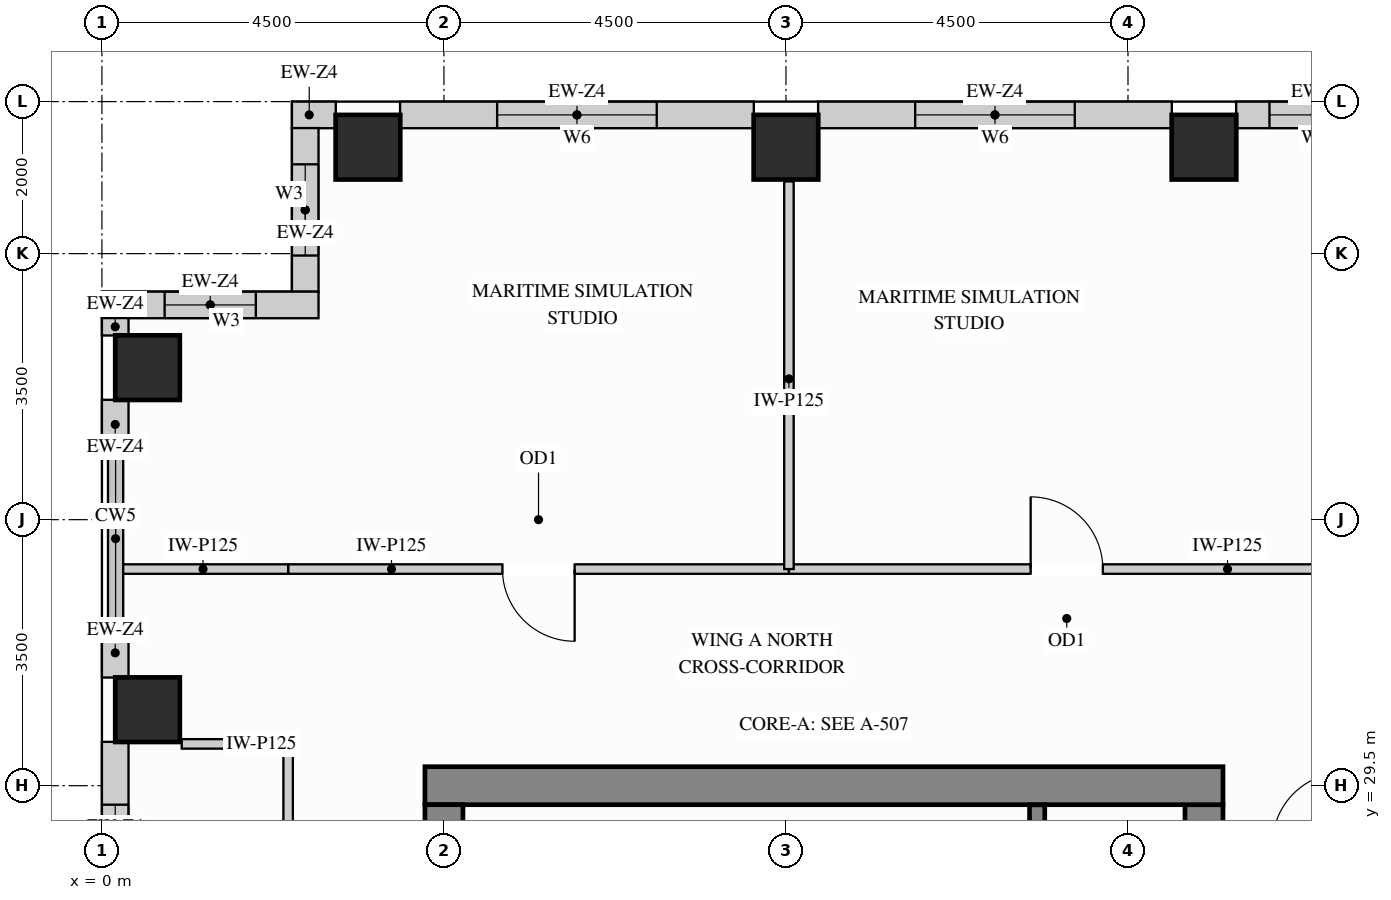
"""IFC4 building model, lengths in metres.
Left out: names, types, materials, properties, quantities, classifications, styles, units other than length and angle.
Written with IfcOpenShell. Run it as: python <this file> out.ifc"""

import sys

from ifc_helpers import new_model, si_unit, direction, frame, frame_2d, origin, origin_2d, place, context, subcontext, project, spatial, rectangle, extrude, source, transform, mapped, element, fill, save


model = new_model("IFC4")
c1 = context("Model", 3, precision=1e-05, world=origin(), true_north=direction((0.0, 1.0)))
c2 = subcontext(c1, "Body", "Model", "MODEL_VIEW")
j1 = project(units=[si_unit("LENGTHUNIT", "METRE"), si_unit("PLANEANGLEUNIT", "RADIAN")], contexts=[c1])
p1 = place(None, origin())
s1 = spatial("IfcSite", under=j1, at=p1, CompositionType="ELEMENT")
p2 = place(p1, origin())
s2 = spatial("IfcBuilding", under=s1, at=p2, CompositionType="ELEMENT")
p3 = place(p2, frame((0.0, 0.0, 273.6)))
s3 = spatial("IfcBuildingStorey", under=s2, at=p3, CompositionType="ELEMENT", Elevation=273.6)
m1 = source(origin(), c2, "Body", "SweptSolid", [
    extrude(rectangle(XDim=0.85, YDim=0.85, at=origin_2d()), origin(), (0.0, 0.0, 1.0), 3.37),
])
for number, where, z_axis, x_axis in (
    (1, (14.5, 37.9, 0.0), (0.0, 0.0, 1.0), (1.0, 0.0, 0.0)),
    (2, (3.5, 37.9, 0.0), (0.0, 0.0, 1.0), (1.0, 0.0, 0.0)),
    (3, (9.0, 37.9, 0.0), (0.0, 0.0, 1.0), (1.0, 0.0, 0.0)),
    (4, (0.6, 30.5, 0.0), (0.0, 0.0, 1.0), (1.0, 0.0, 0.0)),
    (5, (0.6, 35.0, 0.0), (0.0, 0.0, 1.0), (1.0, 0.0, 0.0)),
):
    element("IfcColumn", number, at=place(p3, frame(where, z_axis=z_axis, x_axis=x_axis)), inside=s3, PredefinedType="COLUMN", context=c2, shape_type="MappedRepresentation", body=[
        mapped(m1, transform((0.0, 0.0, 0.0), x_axis=(1.0, 0.0, 0.0), y_axis=(0.0, 1.0, 0.0), z_axis=(0.0, 0.0, 1.0))),
    ])
m2 = source(origin(), c2, "Body", "SweptSolid", [
    extrude(rectangle(XDim=8.37, YDim=0.5, at=frame_2d((4.185, 0.0))), origin(), (0.0, 0.0, 1.0), 3.37),
])
p4 = place(p3, frame((14.5, 20.88, 0.0), z_axis=(0.0, 0.0, 1.0), x_axis=(0.0, 1.0, 0.0)))
e6 = element("IfcWall", 6, at=p4, inside=s3, PredefinedType="SHEAR", context=c2, shape_type="MappedRepresentation", body=[
    mapped(m2, transform((0.0, 0.0, 0.0), x_axis=(1.0, 0.0, 0.0), y_axis=(0.0, 1.0, 0.0), z_axis=(0.0, 0.0, 1.0))),
])
m3 = source(origin(), c2, "Body", "SweptSolid", [
    extrude(rectangle(XDim=10.5, YDim=0.5, at=frame_2d((5.25, 0.0))), origin(), (0.0, 0.0, 1.0), 3.37),
])
p5 = place(p3, frame((4.25, 29.5, 0.0), z_axis=(0.0, 0.0, 1.0), x_axis=(1.0, 0.0, 0.0)))
e7 = element("IfcWall", 7, at=p5, inside=s3, PredefinedType="SHEAR", context=c2, shape_type="MappedRepresentation", body=[
    mapped(m3, transform((0.0, 0.0, 0.0), x_axis=(1.0, 0.0, 0.0), y_axis=(0.0, 1.0, 0.0), z_axis=(0.0, 0.0, 1.0))),
])
m4 = source(origin(), c2, "Body", "SweptSolid", [
    extrude(rectangle(XDim=20.5, YDim=0.5, at=frame_2d((10.25, 0.0))), origin(), (0.0, 0.0, 1.0), 3.37),
])
p6 = place(p3, frame((4.5, 8.75, 0.0), z_axis=(0.0, 0.0, 1.0), x_axis=(0.0, 1.0, 0.0)))
e8 = element("IfcWall", 8, at=p6, inside=s3, PredefinedType="SHEAR", context=c2, shape_type="MappedRepresentation", body=[
    mapped(m4, transform((0.0, 0.0, 0.0), x_axis=(1.0, 0.0, 0.0), y_axis=(0.0, 1.0, 0.0), z_axis=(0.0, 0.0, 1.0))),
])
p7 = place(p3, frame((17.0, 38.325, 0.0), z_axis=(0.0, 0.0, 1.0), x_axis=(-1.0, 0.0, 0.0)))
e9 = element("IfcWall", 9, at=p7, inside=s3, PredefinedType="SOLIDWALL", context=c2, shape_type="SweptSolid", body=[
    extrude(rectangle(XDim=2.077, YDim=0.35, at=frame_2d((1.039, 0.0))), origin(), (0.0, 0.0, 1.0), 3.355),
])
p8 = place(p7, frame((0.438, 0.0, 0.78)))
e10 = element("IfcOpeningElement", 10, at=p8, cuts=e9, PredefinedType="OPENING", context=c2, shape_type="SweptSolid", body=[
    extrude(rectangle(XDim=1.2, YDim=2.25, at=frame_2d((0.6, 1.125))), frame((0.0, 0.185, 0.0), z_axis=(0.0, -1.0, 0.0), x_axis=(1.0, 0.0, 0.0)), (0.0, 0.0, 1.0), 0.37),
])
p9 = place(p3, frame((14.077, 38.325, 0.0), z_axis=(0.0, 0.0, 1.0), x_axis=(-1.0, 0.0, 0.0)))
e11 = element("IfcWall", 11, at=p9, inside=s3, PredefinedType="SOLIDWALL", context=c2, shape_type="SweptSolid", body=[
    extrude(rectangle(XDim=4.654, YDim=0.35, at=frame_2d((2.327, 0.0))), origin(), (0.0, 0.0, 1.0), 3.355),
])
p10 = place(p9, frame((1.277, 0.0, 0.78)))
e12 = element("IfcOpeningElement", 12, at=p10, cuts=e11, PredefinedType="OPENING", context=c2, shape_type="SweptSolid", body=[
    extrude(rectangle(XDim=2.1, YDim=2.25, at=frame_2d((1.05, 1.125))), frame((0.0, 0.185, 0.0), z_axis=(0.0, -1.0, 0.0), x_axis=(1.0, 0.0, 0.0)), (0.0, 0.0, 1.0), 0.37),
])
p11 = place(p3, frame((8.577, 38.325, 0.0), z_axis=(0.0, 0.0, 1.0), x_axis=(-1.0, 0.0, 0.0)))
e13 = element("IfcWall", 13, at=p11, inside=s3, PredefinedType="SOLIDWALL", context=c2, shape_type="SweptSolid", body=[
    extrude(rectangle(XDim=4.654, YDim=0.35, at=frame_2d((2.327, 0.0))), origin(), (0.0, 0.0, 1.0), 3.355),
])
p12 = place(p11, frame((1.277, 0.0, 0.78)))
e14 = element("IfcOpeningElement", 14, at=p12, cuts=e13, PredefinedType="OPENING", context=c2, shape_type="SweptSolid", body=[
    extrude(rectangle(XDim=2.1, YDim=2.25, at=frame_2d((1.05, 1.125))), frame((0.0, 0.185, 0.0), z_axis=(0.0, -1.0, 0.0), x_axis=(1.0, 0.0, 0.0)), (0.0, 0.0, 1.0), 0.37),
])
m5 = source(origin(), c2, "Body", "SweptSolid", [
    extrude(rectangle(XDim=0.577, YDim=0.35, at=frame_2d((0.289, 0.0))), origin(), (0.0, 0.0, 1.0), 3.355),
])
p13 = place(p3, frame((3.077, 38.325, 0.0), z_axis=(0.0, 0.0, 1.0), x_axis=(-1.0, 0.0, 0.0)))
e15 = element("IfcWall", 15, at=p13, inside=s3, PredefinedType="SOLIDWALL", context=c2, shape_type="MappedRepresentation", body=[
    mapped(m5, transform((0.0, 0.0, 0.0), x_axis=(1.0, 0.0, 0.0), y_axis=(0.0, 1.0, 0.0), z_axis=(0.0, 0.0, 1.0))),
])
p14 = place(p3, frame((2.675, 38.152, 0.0), z_axis=(0.0, 0.0, 1.0), x_axis=(0.0, -1.0, 0.0)))
e16 = element("IfcWall", 16, at=p14, inside=s3, PredefinedType="SOLIDWALL", context=c2, shape_type="SweptSolid", body=[
    extrude(rectangle(XDim=2.154, YDim=0.35, at=frame_2d((1.077, 0.0))), origin(), (0.0, 0.0, 1.0), 3.355),
])
p15 = place(p14, frame((0.477, 0.0, 0.78)))
e17 = element("IfcOpeningElement", 17, at=p15, cuts=e16, PredefinedType="OPENING", context=c2, shape_type="SweptSolid", body=[
    extrude(rectangle(XDim=1.2, YDim=2.25, at=frame_2d((0.6, 1.125))), frame((0.0, 0.185, 0.0), z_axis=(0.0, -1.0, 0.0), x_axis=(1.0, 0.0, 0.0)), (0.0, 0.0, 1.0), 0.37),
])
p16 = place(p3, frame((2.85, 35.825, 0.0), z_axis=(0.0, 0.0, 1.0), x_axis=(-1.0, 0.0, 0.0)))
e18 = element("IfcWall", 18, at=p16, inside=s3, PredefinedType="SOLIDWALL", context=c2, shape_type="SweptSolid", body=[
    extrude(rectangle(XDim=2.85, YDim=0.35, at=frame_2d((1.425, 0.0))), origin(), (0.0, 0.0, 1.0), 3.355),
])
p17 = place(p16, frame((0.825, 0.0, 0.78)))
e19 = element("IfcOpeningElement", 19, at=p17, cuts=e18, PredefinedType="OPENING", context=c2, shape_type="SweptSolid", body=[
    extrude(rectangle(XDim=1.2, YDim=2.25, at=frame_2d((0.6, 1.125))), frame((0.0, 0.185, 0.0), z_axis=(0.0, -1.0, 0.0), x_axis=(1.0, 0.0, 0.0)), (0.0, 0.0, 1.0), 0.37),
])
m6 = source(origin(), c2, "Body", "SweptSolid", [
    extrude(rectangle(XDim=0.229, YDim=0.35, at=frame_2d((0.115, 0.0))), origin(), (0.0, 0.0, 1.0), 3.355),
])
p18 = place(p3, frame((0.175, 35.652, 0.0), z_axis=(0.0, 0.0, 1.0), x_axis=(0.0, -1.0, 0.0)))
e20 = element("IfcWall", 20, at=p18, inside=s3, PredefinedType="SOLIDWALL", context=c2, shape_type="MappedRepresentation", body=[
    mapped(m6, transform((0.0, 0.0, 0.0), x_axis=(1.0, 0.0, 0.0), y_axis=(0.0, 1.0, 0.0), z_axis=(0.0, 0.0, 1.0))),
])
m7 = source(origin(), c2, "Body", "SweptSolid", [
    extrude(rectangle(XDim=0.527, YDim=0.35, at=frame_2d((0.263, 0.0))), origin(), (0.0, 0.0, 1.0), 3.355),
])
for number, where, z_axis, x_axis in (
    (21, (0.175, 34.577, 0.0), (0.0, 0.0, 1.0), (0.0, -1.0, 0.0)),
    (22, (0.175, 31.45, 0.0), (0.0, 0.0, 1.0), (0.0, -1.0, 0.0)),
):
    element("IfcWall", number, at=place(p3, frame(where, z_axis=z_axis, x_axis=x_axis)), inside=s3, PredefinedType="SOLIDWALL", context=c2, shape_type="MappedRepresentation", body=[
        mapped(m7, transform((0.0, 0.0, 0.0), x_axis=(1.0, 0.0, 0.0), y_axis=(0.0, 1.0, 0.0), z_axis=(0.0, 0.0, 1.0))),
    ])
p19 = place(p3, frame((0.175, 30.077, 0.0), z_axis=(0.0, 0.0, 1.0), x_axis=(0.0, -1.0, 0.0)))
e23 = element("IfcWall", 23, at=p19, inside=s3, PredefinedType="SOLIDWALL", context=c2, shape_type="SweptSolid", body=[
    extrude(rectangle(XDim=2.854, YDim=0.35, at=frame_2d((1.427, 0.0))), origin(), (0.0, 0.0, 1.0), 3.355),
])
p20 = place(p19, frame((0.827, 0.0, 0.78)))
e24 = element("IfcOpeningElement", 24, at=p20, cuts=e23, PredefinedType="OPENING", context=c2, shape_type="SweptSolid", body=[
    extrude(rectangle(XDim=1.2, YDim=2.25, at=frame_2d((0.6, 1.125))), frame((0.0, 0.185, 0.0), z_axis=(0.0, -1.0, 0.0), x_axis=(1.0, 0.0, 0.0)), (0.0, 0.0, 1.0), 0.37),
])
p21 = place(p3, frame((2.45, 32.35, 0.0), z_axis=(0.0, 0.0, 1.0), x_axis=(1.0, 0.0, 0.0)))
e25 = element("IfcWall", 25, at=p21, inside=s3, PredefinedType="PARTITIONING", context=c2, shape_type="SweptSolid", body=[
    extrude(rectangle(XDim=6.589, YDim=0.125, at=frame_2d((3.294, 0.0))), origin(), (0.0, 0.0, 1.0), 3.355),
])
p22 = place(p21, frame((2.82, 0.0, 0.0)))
e26 = element("IfcOpeningElement", 26, at=p22, cuts=e25, PredefinedType="OPENING", context=c2, shape_type="SweptSolid", body=[
    extrude(rectangle(XDim=0.95, YDim=2.15, at=frame_2d((0.475, 1.075))), frame((0.0, 0.073, 0.0), z_axis=(0.0, -1.0, 0.0), x_axis=(1.0, 0.0, 0.0)), (0.0, 0.0, 1.0), 0.145),
])
p23 = place(p3, frame((9.039, 32.35, 0.0), z_axis=(0.0, 0.0, 1.0), x_axis=(1.0, 0.0, 0.0)))
e27 = element("IfcWall", 27, at=p23, inside=s3, PredefinedType="PARTITIONING", context=c2, shape_type="SweptSolid", body=[
    extrude(rectangle(XDim=7.311, YDim=0.125, at=frame_2d((3.656, 0.0))), origin(), (0.0, 0.0, 1.0), 3.355),
])
p24 = place(p23, frame((3.18, 0.0, 0.0)))
e28 = element("IfcOpeningElement", 28, at=p24, cuts=e27, PredefinedType="OPENING", context=c2, shape_type="SweptSolid", body=[
    extrude(rectangle(XDim=0.95, YDim=2.15, at=frame_2d((0.475, 1.075))), frame((0.0, 0.073, 0.0), z_axis=(0.0, -1.0, 0.0), x_axis=(1.0, 0.0, 0.0)), (0.0, 0.0, 1.0), 0.145),
])
m8 = source(origin(), c2, "Body", "SweptSolid", [
    extrude(rectangle(XDim=2.24, YDim=0.125, at=frame_2d((1.12, 0.0))), origin(), (0.0, 0.0, 1.0), 3.355),
])
p25 = place(p3, frame((0.21, 32.35, 0.0), z_axis=(0.0, 0.0, 1.0), x_axis=(1.0, 0.0, 0.0)))
e29 = element("IfcWall", 29, at=p25, inside=s3, PredefinedType="PARTITIONING", context=c2, shape_type="MappedRepresentation", body=[
    mapped(m8, transform((0.0, 0.0, 0.0), x_axis=(1.0, 0.0, 0.0), y_axis=(0.0, 1.0, 0.0), z_axis=(0.0, 0.0, 1.0))),
])
m9 = source(origin(), c2, "Body", "SweptSolid", [
    extrude(rectangle(XDim=5.1, YDim=0.125, at=frame_2d((2.55, 0.0))), origin(), (0.0, 0.0, 1.0), 3.355),
])
p26 = place(p3, frame((9.039, 32.35, 0.0), z_axis=(0.0, 0.0, 1.0), x_axis=(0.0, 1.0, 0.0)))
e30 = element("IfcWall", 30, at=p26, inside=s3, PredefinedType="PARTITIONING", context=c2, shape_type="MappedRepresentation", body=[
    mapped(m9, transform((0.0, 0.0, 0.0), x_axis=(1.0, 0.0, 0.0), y_axis=(0.0, 1.0, 0.0), z_axis=(0.0, 0.0, 1.0))),
])
m10 = source(origin(), c2, "Body", "SweptSolid", [
    extrude(rectangle(XDim=1.4, YDim=0.125, at=frame_2d((0.7, 0.0))), origin(), (0.0, 0.0, 1.0), 3.355),
])
p27 = place(p3, frame((1.05, 30.05, 0.0), z_axis=(0.0, 0.0, 1.0), x_axis=(1.0, 0.0, 0.0)))
e31 = element("IfcWall", 31, at=p27, inside=s3, PredefinedType="PARTITIONING", context=c2, shape_type="MappedRepresentation", body=[
    mapped(m10, transform((0.0, 0.0, 0.0), x_axis=(1.0, 0.0, 0.0), y_axis=(0.0, 1.0, 0.0), z_axis=(0.0, 0.0, 1.0))),
])
p28 = place(p3, frame((2.45, 22.6, 0.0), z_axis=(0.0, 0.0, 1.0), x_axis=(0.0, 1.0, 0.0)))
e32 = element("IfcWall", 32, at=p28, inside=s3, PredefinedType="PARTITIONING", context=c2, shape_type="SweptSolid", body=[
    extrude(rectangle(XDim=7.45, YDim=0.125, at=frame_2d((3.725, 0.0))), origin(), (0.0, 0.0, 1.0), 3.355),
])
p29 = place(p28, frame((3.25, 0.0, 0.0)))
e33 = element("IfcOpeningElement", 33, at=p29, cuts=e32, PredefinedType="OPENING", context=c2, shape_type="SweptSolid", body=[
    extrude(rectangle(XDim=0.95, YDim=2.15, at=frame_2d((0.475, 1.075))), frame((0.0, 0.073, 0.0), z_axis=(0.0, -1.0, 0.0), x_axis=(1.0, 0.0, 0.0)), (0.0, 0.0, 1.0), 0.145),
])
m11 = source(origin(), c2, "Body", "SweptSolid", [
    extrude(rectangle(XDim=3.803, YDim=0.2, at=frame_2d((1.901, 0.0))), origin(), (0.0, 0.0, 1.0), 3.37),
])
p30 = place(p3, frame((12.305, 25.445, 0.0), z_axis=(0.0, 0.0, 1.0), x_axis=(0.0, 1.0, 0.0)))
e34 = element("IfcWall", 34, at=p30, inside=s3, PredefinedType="SHEAR", context=c2, shape_type="MappedRepresentation", body=[
    mapped(m11, transform((0.0, 0.0, 0.0), x_axis=(1.0, 0.0, 0.0), y_axis=(0.0, 1.0, 0.0), z_axis=(0.0, 0.0, 1.0))),
])
m12 = source(origin(), c2, "Body", "SweptSolid", [
    extrude(rectangle(XDim=0.95, YDim=2.15, at=frame_2d((0.475, 1.075))), frame((0.0, 0.025, 0.0), z_axis=(0.0, -1.0, 0.0), x_axis=(1.0, 0.0, 0.0)), (0.0, 0.0, 1.0), 0.05),
])
p31 = place(p22, origin())
e35 = element("IfcDoor", 35, at=p31, inside=s3, OperationType="SINGLE_SWING_RIGHT", PredefinedType="DOOR", context=c2, shape_type="MappedRepresentation", body=[
    mapped(m12, transform((0.0, 0.0, 0.0), x_axis=(1.0, 0.0, 0.0), y_axis=(0.0, 1.0, 0.0), z_axis=(0.0, 0.0, 1.0))),
])
fill(e26, e35)
p32 = place(p24, origin())
e36 = element("IfcDoor", 36, at=p32, inside=s3, OperationType="SINGLE_SWING_LEFT", PredefinedType="DOOR", context=c2, shape_type="MappedRepresentation", body=[
    mapped(m12, transform((0.0, 0.0, 0.0), x_axis=(1.0, 0.0, 0.0), y_axis=(0.0, 1.0, 0.0), z_axis=(0.0, 0.0, 1.0))),
])
fill(e28, e36)
m13 = source(origin(), c2, "Body", "SweptSolid", [
    extrude(rectangle(XDim=1.2, YDim=2.25, at=frame_2d((0.6, 1.125))), frame((0.0, 0.03, 0.0), z_axis=(0.0, -1.0, 0.0), x_axis=(1.0, 0.0, 0.0)), (0.0, 0.0, 1.0), 0.06),
])
p33 = place(p8, origin())
e37 = element("IfcWindow", 37, at=p33, inside=s3, PartitioningType="SINGLE_PANEL", PredefinedType="WINDOW", context=c2, shape_type="MappedRepresentation", body=[
    mapped(m13, transform((0.0, 0.0, 0.0), x_axis=(1.0, 0.0, 0.0), y_axis=(0.0, 1.0, 0.0), z_axis=(0.0, 0.0, 1.0))),
])
fill(e10, e37)
p34 = place(p15, origin())
e38 = element("IfcWindow", 38, at=p34, inside=s3, PartitioningType="SINGLE_PANEL", PredefinedType="WINDOW", context=c2, shape_type="MappedRepresentation", body=[
    mapped(m13, transform((0.0, 0.0, 0.0), x_axis=(1.0, 0.0, 0.0), y_axis=(0.0, 1.0, 0.0), z_axis=(0.0, 0.0, 1.0))),
])
fill(e17, e38)
p35 = place(p17, origin())
e39 = element("IfcWindow", 39, at=p35, inside=s3, PartitioningType="SINGLE_PANEL", PredefinedType="WINDOW", context=c2, shape_type="MappedRepresentation", body=[
    mapped(m13, transform((0.0, 0.0, 0.0), x_axis=(1.0, 0.0, 0.0), y_axis=(0.0, 1.0, 0.0), z_axis=(0.0, 0.0, 1.0))),
])
fill(e19, e39)
p36 = place(p20, origin())
e40 = element("IfcWindow", 40, at=p36, inside=s3, PartitioningType="SINGLE_PANEL", PredefinedType="WINDOW", context=c2, shape_type="MappedRepresentation", body=[
    mapped(m13, transform((0.0, 0.0, 0.0), x_axis=(1.0, 0.0, 0.0), y_axis=(0.0, 1.0, 0.0), z_axis=(0.0, 0.0, 1.0))),
])
fill(e24, e40)
m14 = source(origin(), c2, "Body", "SweptSolid", [
    extrude(rectangle(XDim=2.1, YDim=2.25, at=frame_2d((1.05, 1.125))), frame((0.0, 0.03, 0.0), z_axis=(0.0, -1.0, 0.0), x_axis=(1.0, 0.0, 0.0)), (0.0, 0.0, 1.0), 0.06),
])
p37 = place(p10, origin())
e41 = element("IfcWindow", 41, at=p37, inside=s3, PartitioningType="SINGLE_PANEL", PredefinedType="WINDOW", context=c2, shape_type="MappedRepresentation", body=[
    mapped(m14, transform((0.0, 0.0, 0.0), x_axis=(1.0, 0.0, 0.0), y_axis=(0.0, 1.0, 0.0), z_axis=(0.0, 0.0, 1.0))),
])
fill(e12, e41)
p38 = place(p12, origin())
e42 = element("IfcWindow", 42, at=p38, inside=s3, PartitioningType="SINGLE_PANEL", PredefinedType="WINDOW", context=c2, shape_type="MappedRepresentation", body=[
    mapped(m14, transform((0.0, 0.0, 0.0), x_axis=(1.0, 0.0, 0.0), y_axis=(0.0, 1.0, 0.0), z_axis=(0.0, 0.0, 1.0))),
])
fill(e14, e42)
save(model, sys.argv[1])
